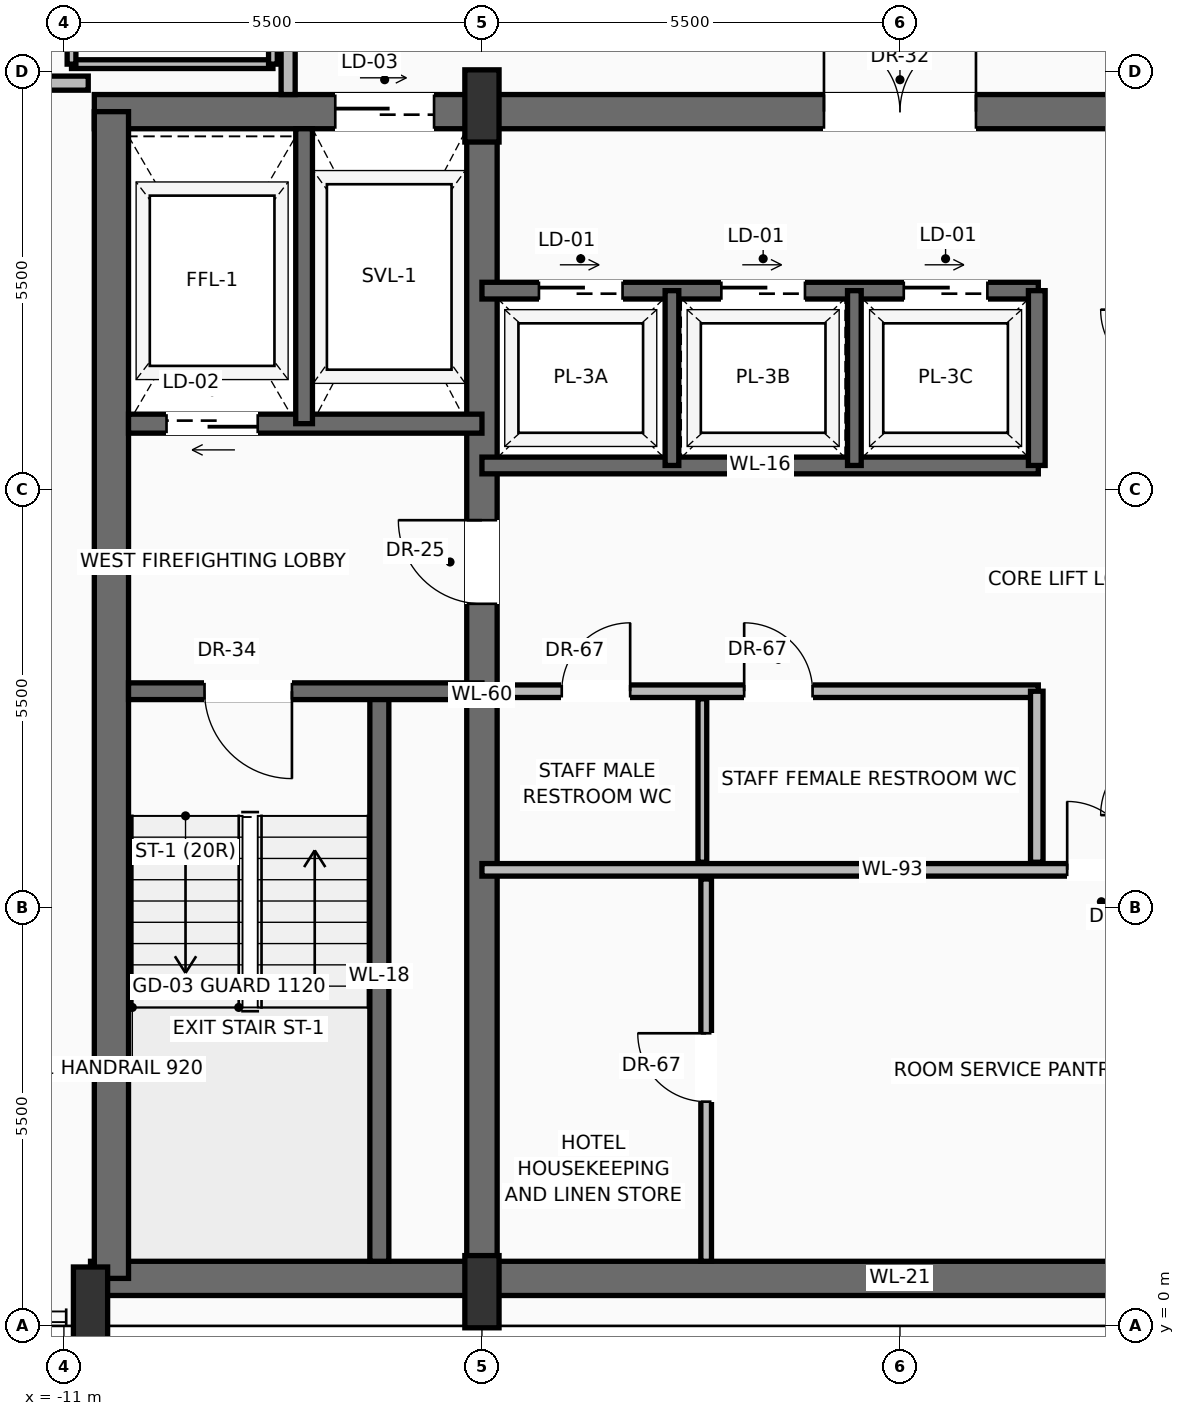
"""IFC4 building model, lengths in metres.
Left out: names, types, materials, properties, quantities, classifications, styles, units other than length and angle.
Written with IfcOpenShell. Run it as: python <this file> out.ifc"""

import sys

from ifc_helpers import new_model, si_unit, direction, frame, frame_2d, origin, origin_2d, place, context, subcontext, project, spatial, rectangle, extrude, source, transform, mapped, element, fill, save


model = new_model("IFC4")
c1 = context("Model", 3, precision=1e-05, world=origin(), true_north=direction((0.0, 1.0)))
c2 = subcontext(c1, "Body", "Model", "MODEL_VIEW")
j1 = project(units=[si_unit("LENGTHUNIT", "METRE"), si_unit("PLANEANGLEUNIT", "RADIAN")], contexts=[c1])
p1 = place(None, origin())
s1 = spatial("IfcSite", under=j1, at=p1, CompositionType="ELEMENT")
p2 = place(p1, origin())
s2 = spatial("IfcBuilding", under=s1, at=p2, CompositionType="ELEMENT")
p3 = place(p2, frame((0.0, 0.0, 276.45)))
s3 = spatial("IfcBuildingStorey", under=s2, at=p3, CompositionType="ELEMENT", Elevation=276.45)
p4 = place(p3, frame((-10.65, 0.625, 0.0), z_axis=(0.0, 0.0, 1.0), x_axis=(1.0, 0.0, 0.0)))
e1 = element("IfcWall", 1, at=p4, inside=s3, PredefinedType="SHEAR", context=c2, shape_type="SweptSolid", body=[
    extrude(rectangle(XDim=21.3, YDim=0.45, at=frame_2d((10.65, 0.0))), origin(), (0.0, 0.0, 1.0), 3.24),
])
p5 = place(p3, frame((-10.6, 15.975, 0.0), z_axis=(0.0, 0.0, 1.0), x_axis=(1.0, 0.0, 0.0)))
e2 = element("IfcWall", 2, at=p5, inside=s3, PredefinedType="SHEAR", context=c2, shape_type="SweptSolid", body=[
    extrude(rectangle(XDim=21.2, YDim=0.45, at=frame_2d((10.6, 0.0))), origin(), (0.0, 0.0, 1.0), 3.24),
])
p6 = place(p5, frame((3.17, 0.0, 0.0)))
e3 = element("IfcOpeningElement", 3, at=p6, cuts=e2, PredefinedType="OPENING", context=c2, shape_type="SweptSolid", body=[
    extrude(rectangle(XDim=1.3, YDim=2.3, at=frame_2d((0.65, 1.15))), frame((0.0, 0.235, 0.0), z_axis=(0.0, -1.0, 0.0), x_axis=(1.0, 0.0, 0.0)), (0.0, 0.0, 1.0), 0.47),
])
p7 = place(p5, frame((9.6, 0.0, 0.0)))
e4 = element("IfcOpeningElement", 4, at=p7, cuts=e2, PredefinedType="OPENING", context=c2, shape_type="SweptSolid", body=[
    extrude(rectangle(XDim=2.0, YDim=2.4, at=frame_2d((1.0, 1.2))), frame((0.0, 0.235, 0.0), z_axis=(0.0, -1.0, 0.0), x_axis=(1.0, 0.0, 0.0)), (0.0, 0.0, 1.0), 0.47),
])
p8 = place(p3, frame((-10.375, 0.625, 0.0), z_axis=(0.0, 0.0, 1.0), x_axis=(0.0, 1.0, 0.0)))
e5 = element("IfcWall", 5, at=p8, inside=s3, PredefinedType="SHEAR", context=c2, shape_type="SweptSolid", body=[
    extrude(rectangle(XDim=15.35, YDim=0.45, at=frame_2d((7.675, 0.0))), origin(), (0.0, 0.0, 1.0), 3.24),
])
p9 = place(p3, frame((-5.5, 0.625, 0.0), z_axis=(0.0, 0.0, 1.0), x_axis=(0.0, 1.0, 0.0)))
e6 = element("IfcWall", 6, at=p9, inside=s3, PredefinedType="SHEAR", context=c2, shape_type="SweptSolid", body=[
    extrude(rectangle(XDim=15.35, YDim=0.4, at=frame_2d((7.675, 0.0))), origin(), (0.0, 0.0, 1.0), 3.24),
])
p10 = place(p9, frame((8.875, 0.0, 0.0)))
e7 = element("IfcOpeningElement", 7, at=p10, cuts=e6, PredefinedType="OPENING", context=c2, shape_type="SweptSolid", body=[
    extrude(rectangle(XDim=1.1, YDim=2.2, at=frame_2d((0.55, 1.1))), frame((0.0, 0.21, 0.0), z_axis=(0.0, -1.0, 0.0), x_axis=(1.0, 0.0, 0.0)), (0.0, 0.0, 1.0), 0.42),
])
m1 = source(origin(), c2, "Body", "SweptSolid", [
    extrude(rectangle(XDim=0.45, YDim=0.95, at=origin_2d()), origin(), (0.0, 0.0, 1.0), 3.45),
])
for number, where, z_axis, x_axis in (
    (8, (-10.65, 0.3, 0.0), (0.0, 0.0, 1.0), (1.0, 0.0, 0.0)),
    (9, (-5.5, 0.45, 0.0), (0.0, 0.0, 1.0), (1.0, 0.0, 0.0)),
    (10, (-5.5, 16.05, 0.0), (0.0, 0.0, 1.0), (1.0, 0.0, 0.0)),
):
    element("IfcColumn", number, at=place(p3, frame(where, z_axis=z_axis, x_axis=x_axis)), inside=s3, PredefinedType="PILASTER", context=c2, shape_type="MappedRepresentation", body=[
        mapped(m1, transform((0.0, 0.0, 0.0), scale=1.0)),
    ])
p11 = place(p3, frame((-18.435, 14.229, 0.0), z_axis=(0.0, 0.0, 1.0), x_axis=(0.50006385546, 0.865988533678, 0.0)))
e11 = element("IfcWall", 11, at=p11, inside=s3, PredefinedType="SOLIDWALL", context=c2, shape_type="SweptSolid", body=[
    extrude(rectangle(XDim=20.097, YDim=0.28, at=frame_2d((10.048, 0.0))), origin(), (0.0, 0.0, 1.0), 2.82),
])
p12 = place(p11, frame((4.823, 0.0, 0.0)))
e12 = element("IfcOpeningElement", 12, at=p12, cuts=e11, PredefinedType="OPENING", context=c2, shape_type="SweptSolid", body=[
    extrude(rectangle(XDim=1.6, YDim=2.35, at=frame_2d((0.8, 1.175))), frame((0.0, 0.15, 0.0), z_axis=(0.0, -1.0, 0.0), x_axis=(1.0, 0.0, 0.0)), (0.0, 0.0, 1.0), 0.3),
])
p13 = place(p11, frame((13.666, 0.0, 0.9)))
e13 = element("IfcOpeningElement", 13, at=p13, cuts=e11, PredefinedType="OPENING", context=c2, shape_type="SweptSolid", body=[
    extrude(rectangle(XDim=2.0, YDim=1.75, at=frame_2d((1.0, 0.875))), frame((0.0, 0.15, 0.0), z_axis=(0.0, -1.0, 0.0), x_axis=(1.0, 0.0, 0.0)), (0.0, 0.0, 1.0), 0.3),
])
p14 = place(p3, frame((-6.85, 0.85, 0.0), z_axis=(0.0, 0.0, 1.0), x_axis=(0.0, 1.0, 0.0)))
e14 = element("IfcWall", 14, at=p14, inside=s3, PredefinedType="SOLIDWALL", context=c2, shape_type="SweptSolid", body=[
    extrude(rectangle(XDim=7.5, YDim=0.25, at=frame_2d((3.75, 0.0))), origin(), (0.0, 0.0, 1.0), 3.24),
])
p15 = place(p3, frame((-5.5, 8.35, 0.0), z_axis=(0.0, 0.0, 1.0), x_axis=(-1.0, 0.0, 0.0)))
e15 = element("IfcWall", 15, at=p15, inside=s3, PredefinedType="SOLIDWALL", context=c2, shape_type="SweptSolid", body=[
    extrude(rectangle(XDim=4.65, YDim=0.22, at=frame_2d((2.325, 0.0))), origin(), (0.0, 0.0, 1.0), 3.24),
])
p16 = place(p15, frame((2.5, 0.0, 0.0)))
e16 = element("IfcOpeningElement", 16, at=p16, cuts=e15, PredefinedType="OPENING", context=c2, shape_type="SweptSolid", body=[
    extrude(rectangle(XDim=1.15, YDim=2.2, at=frame_2d((0.575, 1.1))), frame((0.0, 0.12, 0.0), z_axis=(0.0, -1.0, 0.0), x_axis=(1.0, 0.0, 0.0)), (0.0, 0.0, 1.0), 0.24),
])
p17 = place(p3, frame((-5.5, 11.87, 0.0), z_axis=(0.0, 0.0, 1.0), x_axis=(-1.0, 0.0, 0.0)))
e17 = element("IfcWall", 17, at=p17, inside=s3, PredefinedType="SOLIDWALL", context=c2, shape_type="SweptSolid", body=[
    extrude(rectangle(XDim=4.65, YDim=0.25, at=frame_2d((2.325, 0.0))), origin(), (0.0, 0.0, 1.0), 3.24),
])
p18 = place(p17, frame((2.95, 0.0, 0.0)))
e18 = element("IfcOpeningElement", 18, at=p18, cuts=e17, PredefinedType="OPENING", context=c2, shape_type="SweptSolid", body=[
    extrude(rectangle(XDim=1.2, YDim=2.25, at=frame_2d((0.6, 1.125))), frame((0.0, 0.135, 0.0), z_axis=(0.0, -1.0, 0.0), x_axis=(1.0, 0.0, 0.0)), (0.0, 0.0, 1.0), 0.27),
])
p19 = place(p3, frame((-7.84, 11.87, 0.0), z_axis=(0.0, 0.0, 1.0), x_axis=(0.0, 1.0, 0.0)))
e19 = element("IfcWall", 19, at=p19, inside=s3, PredefinedType="SOLIDWALL", context=c2, shape_type="SweptSolid", body=[
    extrude(rectangle(XDim=3.88, YDim=0.22, at=frame_2d((1.94, 0.0))), origin(), (0.0, 0.0, 1.0), 3.24),
])
p20 = place(p3, frame((-5.5, 6.0, 0.0), z_axis=(0.0, 0.0, 1.0), x_axis=(1.0, 0.0, 0.0)))
e20 = element("IfcWall", 20, at=p20, inside=s3, PredefinedType="PARTITIONING", context=c2, shape_type="SweptSolid", body=[
    extrude(rectangle(XDim=10.8, YDim=0.165, at=frame_2d((5.4, 0.0))), origin(), (0.0, 0.0, 1.0), 3.232),
])
p21 = place(p20, frame((7.7, 0.0, 0.0)))
e21 = element("IfcOpeningElement", 21, at=p21, cuts=e20, PredefinedType="OPENING", context=c2, shape_type="SweptSolid", body=[
    extrude(rectangle(XDim=0.9, YDim=2.1, at=frame_2d((0.45, 1.05))), frame((0.0, 0.093, 0.0), z_axis=(0.0, -1.0, 0.0), x_axis=(1.0, 0.0, 0.0)), (0.0, 0.0, 1.0), 0.185),
])
p22 = place(p3, frame((-2.55, 0.85, 0.0), z_axis=(0.0, 0.0, 1.0), x_axis=(0.0, 1.0, 0.0)))
e22 = element("IfcWall", 22, at=p22, inside=s3, PredefinedType="PARTITIONING", context=c2, shape_type="SweptSolid", body=[
    extrude(rectangle(XDim=5.03, YDim=0.14, at=frame_2d((2.515, 0.0))), origin(), (0.0, 0.0, 1.0), 3.232),
])
p23 = place(p22, frame((2.1, 0.0, 0.0)))
e23 = element("IfcOpeningElement", 23, at=p23, cuts=e22, PredefinedType="OPENING", context=c2, shape_type="SweptSolid", body=[
    extrude(rectangle(XDim=0.9, YDim=2.1, at=frame_2d((0.45, 1.05))), frame((0.0, 0.08, 0.0), z_axis=(0.0, -1.0, 0.0), x_axis=(1.0, 0.0, 0.0)), (0.0, 0.0, 1.0), 0.16),
])
p24 = place(p3, frame((-5.3, 8.35, 0.0), z_axis=(0.0, 0.0, 1.0), x_axis=(1.0, 0.0, 0.0)))
e24 = element("IfcWall", 24, at=p24, inside=s3, PredefinedType="PARTITIONING", context=c2, shape_type="SweptSolid", body=[
    extrude(rectangle(XDim=7.12, YDim=0.165, at=frame_2d((3.56, 0.0))), origin(), (0.0, 0.0, 1.0), 3.232),
])
p25 = place(p24, frame((0.85, 0.0, 0.0)))
e25 = element("IfcOpeningElement", 25, at=p25, cuts=e24, PredefinedType="OPENING", context=c2, shape_type="SweptSolid", body=[
    extrude(rectangle(XDim=0.9, YDim=2.1, at=frame_2d((0.45, 1.05))), frame((0.0, 0.093, 0.0), z_axis=(0.0, -1.0, 0.0), x_axis=(1.0, 0.0, 0.0)), (0.0, 0.0, 1.0), 0.185),
])
p26 = place(p24, frame((3.25, 0.0, 0.0)))
e26 = element("IfcOpeningElement", 26, at=p26, cuts=e24, PredefinedType="OPENING", context=c2, shape_type="SweptSolid", body=[
    extrude(rectangle(XDim=0.9, YDim=2.1, at=frame_2d((0.45, 1.05))), frame((0.0, 0.093, 0.0), z_axis=(0.0, -1.0, 0.0), x_axis=(1.0, 0.0, 0.0)), (0.0, 0.0, 1.0), 0.185),
])
p27 = place(p3, frame((1.8, 6.1, 0.0), z_axis=(0.0, 0.0, 1.0), x_axis=(0.0, 1.0, 0.0)))
e27 = element("IfcWall", 27, at=p27, inside=s3, PredefinedType="PARTITIONING", context=c2, shape_type="SweptSolid", body=[
    extrude(rectangle(XDim=2.25, YDim=0.165, at=frame_2d((1.125, 0.0))), origin(), (0.0, 0.0, 1.0), 3.232),
])
p28 = place(p3, frame((-2.6, 6.1, 0.0), z_axis=(0.0, 0.0, 1.0), x_axis=(0.0, 1.0, 0.0)))
e28 = element("IfcWall", 28, at=p28, inside=s3, PredefinedType="PARTITIONING", context=c2, shape_type="SweptSolid", body=[
    extrude(rectangle(XDim=2.15, YDim=0.115, at=frame_2d((1.075, 0.0))), origin(), (0.0, 0.0, 1.0), 3.232),
])
p29 = place(p3, frame((-5.5, 11.32, 0.0), z_axis=(0.0, 0.0, 1.0), x_axis=(1.0, 0.0, 0.0)))
e29 = element("IfcWall", 29, at=p29, inside=s3, PredefinedType="SOLIDWALL", context=c2, shape_type="SweptSolid", body=[
    extrude(rectangle(XDim=7.32, YDim=0.22, at=frame_2d((3.66, 0.0))), origin(), (0.0, 0.0, 1.0), 3.24),
])
p30 = place(p3, frame((-5.5, 13.62, 0.0), z_axis=(0.0, 0.0, 1.0), x_axis=(1.0, 0.0, 0.0)))
e30 = element("IfcWall", 30, at=p30, inside=s3, PredefinedType="SOLIDWALL", context=c2, shape_type="SweptSolid", body=[
    extrude(rectangle(XDim=7.32, YDim=0.22, at=frame_2d((3.66, 0.0))), origin(), (0.0, 0.0, 1.0), 3.24),
])
p31 = place(p30, frame((0.75, 0.0, 0.0)))
e31 = element("IfcOpeningElement", 31, at=p31, cuts=e30, PredefinedType="OPENING", context=c2, shape_type="SweptSolid", body=[
    extrude(rectangle(XDim=1.1, YDim=2.2, at=frame_2d((0.55, 1.1))), frame((0.0, 0.12, 0.0), z_axis=(0.0, -1.0, 0.0), x_axis=(1.0, 0.0, 0.0)), (0.0, 0.0, 1.0), 0.24),
])
p32 = place(p30, frame((3.15, 0.0, 0.0)))
e32 = element("IfcOpeningElement", 32, at=p32, cuts=e30, PredefinedType="OPENING", context=c2, shape_type="SweptSolid", body=[
    extrude(rectangle(XDim=1.1, YDim=2.2, at=frame_2d((0.55, 1.1))), frame((0.0, 0.12, 0.0), z_axis=(0.0, -1.0, 0.0), x_axis=(1.0, 0.0, 0.0)), (0.0, 0.0, 1.0), 0.24),
])
p33 = place(p30, frame((5.55, 0.0, 0.0)))
e33 = element("IfcOpeningElement", 33, at=p33, cuts=e30, PredefinedType="OPENING", context=c2, shape_type="SweptSolid", body=[
    extrude(rectangle(XDim=1.1, YDim=2.2, at=frame_2d((0.55, 1.1))), frame((0.0, 0.12, 0.0), z_axis=(0.0, -1.0, 0.0), x_axis=(1.0, 0.0, 0.0)), (0.0, 0.0, 1.0), 0.24),
])
p34 = place(p3, frame((1.8, 11.32, 0.0), z_axis=(0.0, 0.0, 1.0), x_axis=(0.0, 1.0, 0.0)))
e34 = element("IfcWall", 34, at=p34, inside=s3, PredefinedType="SOLIDWALL", context=c2, shape_type="SweptSolid", body=[
    extrude(rectangle(XDim=2.3, YDim=0.22, at=frame_2d((1.15, 0.0))), origin(), (0.0, 0.0, 1.0), 3.24),
])
for number, where, z_axis, x_axis in (
    (35, (-3.0, 11.32, 0.0), (0.0, 0.0, 1.0), (0.0, 1.0, 0.0)),
    (36, (-0.6, 11.32, 0.0), (0.0, 0.0, 1.0), (0.0, 1.0, 0.0)),
):
    element("IfcWall", number, at=place(p3, frame(where, z_axis=z_axis, x_axis=x_axis)), inside=s3, PredefinedType="SOLIDWALL", context=c2, shape_type="SweptSolid", body=[
        extrude(rectangle(XDim=2.3, YDim=0.18, at=frame_2d((1.15, 0.0))), origin(), (0.0, 0.0, 1.0), 3.24),
    ])
p35 = place(p3, frame((-8.05, 16.2, 0.0), z_axis=(0.0, 0.0, 1.0), x_axis=(0.0, 1.0, 0.0)))
e37 = element("IfcWall", 37, at=p35, inside=s3, PredefinedType="PARTITIONING", context=c2, shape_type="SweptSolid", body=[
    extrude(rectangle(XDim=12.4, YDim=0.185, at=frame_2d((6.2, 0.0))), origin(), (0.0, 0.0, 1.0), 3.232),
])
p36 = place(p35, frame((3.218, 0.0, 0.0)))
e38 = element("IfcOpeningElement", 38, at=p36, cuts=e37, PredefinedType="OPENING", context=c2, shape_type="SweptSolid", body=[
    extrude(rectangle(XDim=1.05, YDim=2.25, at=frame_2d((0.525, 1.125))), frame((0.0, 0.103, 0.0), z_axis=(0.0, -1.0, 0.0), x_axis=(1.0, 0.0, 0.0)), (0.0, 0.0, 1.0), 0.205),
])
p37 = place(p35, frame((8.936, 0.0, 0.0)))
e39 = element("IfcOpeningElement", 39, at=p37, cuts=e37, PredefinedType="OPENING", context=c2, shape_type="SweptSolid", body=[
    extrude(rectangle(XDim=1.05, YDim=2.25, at=frame_2d((0.525, 1.125))), frame((0.0, 0.103, 0.0), z_axis=(0.0, -1.0, 0.0), x_axis=(1.0, 0.0, 0.0)), (0.0, 0.0, 1.0), 0.205),
])
p38 = place(p3, frame((-17.36, 16.35, 0.0), z_axis=(0.0, 0.0, 1.0), x_axis=(1.0, 0.0, 0.0)))
e40 = element("IfcWall", 40, at=p38, inside=s3, PredefinedType="PARTITIONING", context=c2, shape_type="SweptSolid", body=[
    extrude(rectangle(XDim=6.68, YDim=0.185, at=frame_2d((3.34, 0.0))), origin(), (0.0, 0.0, 1.0), 3.232),
])
p39 = place(p38, frame((3.715, 0.0, 0.0)))
e41 = element("IfcOpeningElement", 41, at=p39, cuts=e40, PredefinedType="OPENING", context=c2, shape_type="SweptSolid", body=[
    extrude(rectangle(XDim=1.05, YDim=2.25, at=frame_2d((0.525, 1.125))), frame((0.0, 0.103, 0.0), z_axis=(0.0, -1.0, 0.0), x_axis=(1.0, 0.0, 0.0)), (0.0, 0.0, 1.0), 0.205),
])
p40 = place(p3, frame((-10.9, 16.6, 0.0), z_axis=(0.0, 0.0, 1.0), x_axis=(1.0, 0.0, 0.0)))
e42 = element("IfcWall", 42, at=p40, inside=s3, PredefinedType="PARTITIONING", context=c2, shape_type="SweptSolid", body=[
    extrude(rectangle(XDim=2.65, YDim=0.115, at=frame_2d((1.325, 0.0))), origin(), (0.0, 0.0, 1.0), 3.232),
])
p41 = place(p3, frame((-10.9, 16.6, 0.0), z_axis=(0.0, 0.0, 1.0), x_axis=(0.0, 1.0, 0.0)))
e43 = element("IfcWall", 43, at=p41, inside=s3, PredefinedType="PARTITIONING", context=c2, shape_type="SweptSolid", body=[
    extrude(rectangle(XDim=2.4, YDim=0.115, at=frame_2d((1.2, 0.0))), origin(), (0.0, 0.0, 1.0), 3.232),
])
p42 = place(p41, frame((0.75, 0.0, 0.0)))
e44 = element("IfcOpeningElement", 44, at=p42, cuts=e43, PredefinedType="OPENING", context=c2, shape_type="SweptSolid", body=[
    extrude(rectangle(XDim=0.9, YDim=2.15, at=frame_2d((0.45, 1.075))), frame((0.0, 0.067, 0.0), z_axis=(0.0, -1.0, 0.0), x_axis=(1.0, 0.0, 0.0)), (0.0, 0.0, 1.0), 0.135),
])
p43 = place(p3, frame((-8.25, 16.6, 0.0), z_axis=(0.0, 0.0, 1.0), x_axis=(0.0, 1.0, 0.0)))
e45 = element("IfcWall", 45, at=p43, inside=s3, PredefinedType="PARTITIONING", context=c2, shape_type="SweptSolid", body=[
    extrude(rectangle(XDim=2.4, YDim=0.115, at=frame_2d((1.2, 0.0))), origin(), (0.0, 0.0, 1.0), 3.232),
])
m2 = source(origin(), c2, "Body", "SweptSolid", [
    extrude(rectangle(XDim=1.15, YDim=2.2, at=frame_2d((0.575, 1.1))), frame((0.0, 0.025, 0.0), z_axis=(0.0, -1.0, 0.0), x_axis=(1.0, 0.0, 0.0)), (0.0, 0.0, 1.0), 0.05),
])
p44 = place(p16, origin())
e46 = element("IfcDoor", 46, at=p44, inside=s3, OperationType="SINGLE_SWING_LEFT", PredefinedType="DOOR", context=c2, shape_type="MappedRepresentation", body=[
    mapped(m2, transform((0.0, 0.0, 0.0), scale=1.0)),
])
fill(e16, e46)
m3 = source(origin(), c2, "Body", "SweptSolid", [
    extrude(rectangle(XDim=1.1, YDim=2.2, at=frame_2d((0.55, 1.1))), frame((0.0, 0.025, 0.0), z_axis=(0.0, -1.0, 0.0), x_axis=(1.0, 0.0, 0.0)), (0.0, 0.0, 1.0), 0.05),
])
p45 = place(p10, origin())
e47 = element("IfcDoor", 47, at=p45, inside=s3, OperationType="SINGLE_SWING_RIGHT", PredefinedType="DOOR", context=c2, shape_type="MappedRepresentation", body=[
    mapped(m3, transform((0.0, 0.0, 0.0), scale=1.0)),
])
fill(e7, e47)
m4 = source(origin(), c2, "Body", "SweptSolid", [
    extrude(rectangle(XDim=1.2, YDim=2.25, at=frame_2d((0.6, 1.125))), frame((0.0, 0.025, 0.0), z_axis=(0.0, -1.0, 0.0), x_axis=(1.0, 0.0, 0.0)), (0.0, 0.0, 1.0), 0.05),
])
p46 = place(p18, origin())
e48 = element("IfcDoor", 48, at=p46, inside=s3, OperationType="SLIDING_TO_LEFT", PredefinedType="DOOR", context=c2, shape_type="MappedRepresentation", body=[
    mapped(m4, transform((0.0, 0.0, 0.0), scale=1.0)),
])
fill(e18, e48)
m5 = source(origin(), c2, "Body", "SweptSolid", [
    extrude(rectangle(XDim=1.3, YDim=2.3, at=frame_2d((0.65, 1.15))), frame((0.0, 0.025, 0.0), z_axis=(0.0, -1.0, 0.0), x_axis=(1.0, 0.0, 0.0)), (0.0, 0.0, 1.0), 0.05),
])
p47 = place(p6, origin())
e49 = element("IfcDoor", 49, at=p47, inside=s3, OperationType="SLIDING_TO_RIGHT", PredefinedType="DOOR", context=c2, shape_type="MappedRepresentation", body=[
    mapped(m5, transform((0.0, 0.0, 0.0), scale=1.0)),
])
fill(e3, e49)
m6 = source(origin(), c2, "Body", "SweptSolid", [
    extrude(rectangle(XDim=2.0, YDim=2.4, at=frame_2d((1.0, 1.2))), frame((0.0, 0.025, 0.0), z_axis=(0.0, -1.0, 0.0), x_axis=(1.0, 0.0, 0.0)), (0.0, 0.0, 1.0), 0.05),
])
p48 = place(p7, origin())
e50 = element("IfcDoor", 50, at=p48, inside=s3, OperationType="DOUBLE_DOOR_SINGLE_SWING", PredefinedType="DOOR", context=c2, shape_type="MappedRepresentation", body=[
    mapped(m6, transform((0.0, 0.0, 0.0), scale=1.0)),
])
fill(e4, e50)
m7 = source(origin(), c2, "Body", "SweptSolid", [
    extrude(rectangle(XDim=0.9, YDim=2.1, at=frame_2d((0.45, 1.05))), frame((0.0, 0.025, 0.0), z_axis=(0.0, -1.0, 0.0), x_axis=(1.0, 0.0, 0.0)), (0.0, 0.0, 1.0), 0.05),
])
p49 = place(p21, origin())
e51 = element("IfcDoor", 51, at=p49, inside=s3, OperationType="SINGLE_SWING_LEFT", PredefinedType="DOOR", context=c2, shape_type="MappedRepresentation", body=[
    mapped(m7, transform((0.0, 0.0, 0.0), scale=1.0)),
])
fill(e21, e51)
p50 = place(p23, origin())
e52 = element("IfcDoor", 52, at=p50, inside=s3, OperationType="SINGLE_SWING_RIGHT", PredefinedType="DOOR", context=c2, shape_type="MappedRepresentation", body=[
    mapped(m7, transform((0.0, 0.0, 0.0), scale=1.0)),
])
fill(e23, e52)
p51 = place(p25, origin())
e53 = element("IfcDoor", 53, at=p51, inside=s3, OperationType="SINGLE_SWING_RIGHT", PredefinedType="DOOR", context=c2, shape_type="MappedRepresentation", body=[
    mapped(m7, transform((0.0, 0.0, 0.0), scale=1.0)),
])
fill(e25, e53)
p52 = place(p26, origin())
e54 = element("IfcDoor", 54, at=p52, inside=s3, OperationType="SINGLE_SWING_LEFT", PredefinedType="DOOR", context=c2, shape_type="MappedRepresentation", body=[
    mapped(m7, transform((0.0, 0.0, 0.0), scale=1.0)),
])
fill(e26, e54)
m8 = source(origin(), c2, "Body", "SweptSolid", [
    extrude(rectangle(XDim=1.1, YDim=2.2, at=frame_2d((0.55, 1.1))), frame((0.0, 0.025, 0.0), z_axis=(0.0, -1.0, 0.0), x_axis=(1.0, 0.0, 0.0)), (0.0, 0.0, 1.0), 0.05),
])
p53 = place(p31, origin())
e55 = element("IfcDoor", 55, at=p53, inside=s3, OperationType="SLIDING_TO_RIGHT", PredefinedType="DOOR", context=c2, shape_type="MappedRepresentation", body=[
    mapped(m8, transform((0.0, 0.0, 0.0), scale=1.0)),
])
fill(e31, e55)
p54 = place(p32, origin())
e56 = element("IfcDoor", 56, at=p54, inside=s3, OperationType="SLIDING_TO_RIGHT", PredefinedType="DOOR", context=c2, shape_type="MappedRepresentation", body=[
    mapped(m8, transform((0.0, 0.0, 0.0), scale=1.0)),
])
fill(e32, e56)
p55 = place(p33, origin())
e57 = element("IfcDoor", 57, at=p55, inside=s3, OperationType="SLIDING_TO_RIGHT", PredefinedType="DOOR", context=c2, shape_type="MappedRepresentation", body=[
    mapped(m8, transform((0.0, 0.0, 0.0), scale=1.0)),
])
fill(e33, e57)
save(model, sys.argv[1])
